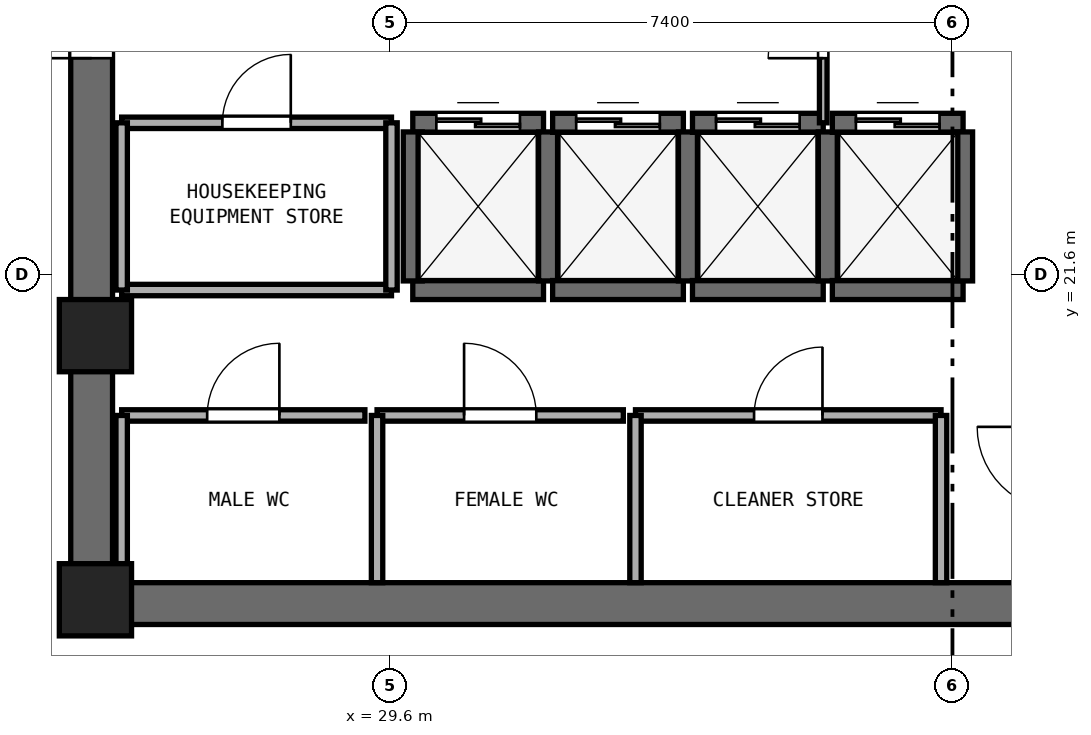
"""IFC4 building model, lengths in metres.
Left out: names, types, materials, properties, quantities, classifications, styles, units other than length and angle.
Written with IfcOpenShell. Run it as: python <this file> out.ifc"""

import sys

from ifc_helpers import new_model, si_unit, direction, frame, frame_2d, origin, origin_2d, place, context, subcontext, project, spatial, rectangle, extrude, element, fill, save


model = new_model("IFC4")
c1 = context("Model", 3, precision=1e-05, world=origin(), true_north=direction((0.0, 1.0)))
c2 = subcontext(c1, "Body", "Model", "MODEL_VIEW")
j1 = project(units=[si_unit("LENGTHUNIT", "METRE"), si_unit("PLANEANGLEUNIT", "RADIAN")], contexts=[c1])
p1 = place(None, origin())
s1 = spatial("IfcSite", under=j1, at=p1, CompositionType="ELEMENT")
p2 = place(p1, origin())
s2 = spatial("IfcBuilding", under=s1, at=p2, CompositionType="ELEMENT")
p3 = place(p2, frame((0.0, 0.0, 208.6)))
s3 = spatial("IfcBuildingStorey", under=s2, at=p3, CompositionType="ELEMENT", Elevation=208.6)
p4 = place(p3, frame((25.4, 17.275, 0.0), z_axis=(0.0, 0.0, 1.0), x_axis=(1.0, 0.0, 0.0)))
e1 = element("IfcWall", 1, at=p4, inside=s3, PredefinedType="SHEAR", context=c2, shape_type="SweptSolid", body=[
    extrude(rectangle(XDim=23.2, YDim=0.55, at=frame_2d((11.6, 0.0))), origin(), (0.0, 0.0, 1.0), 3.54),
])
p5 = place(p3, frame((25.675, 17.55, 0.0), z_axis=(0.0, 0.0, 1.0), x_axis=(0.0, 1.0, 0.0)))
e2 = element("IfcWall", 2, at=p5, inside=s3, PredefinedType="SHEAR", context=c2, shape_type="SweptSolid", body=[
    extrude(rectangle(XDim=15.3, YDim=0.55, at=frame_2d((7.65, 0.0))), origin(), (0.0, 0.0, 1.0), 3.54),
])
p6 = place(p5, frame((6.9, 0.0, 0.0)))
e3 = element("IfcOpeningElement", 3, at=p6, cuts=e2, PredefinedType="OPENING", context=c2, shape_type="SweptSolid", body=[
    extrude(rectangle(XDim=1.5, YDim=2.15, at=frame_2d((0.75, 1.075))), frame((0.0, 0.285, 0.0), z_axis=(0.0, -1.0, 0.0), x_axis=(1.0, 0.0, 0.0)), (0.0, 0.0, 1.0), 0.57),
])
for number, where, z_axis, x_axis in (
    (4, (25.725, 17.325, 0.0), (0.0, 0.0, 1.0), (1.0, 0.0, 0.0)),
    (5, (25.725, 20.8, 0.0), (0.0, 0.0, 1.0), (1.0, 0.0, 0.0)),
):
    element("IfcColumn", number, at=place(p3, frame(where, z_axis=z_axis, x_axis=x_axis)), inside=s3, PredefinedType="PILASTER", context=c2, shape_type="SweptSolid", body=[
        extrude(rectangle(XDim=0.95, YDim=0.95, at=origin_2d()), origin(), (0.0, 0.0, 1.0), 3.8),
    ])
p7 = place(p3, frame((29.9, 21.4, 0.0), z_axis=(0.0, 0.0, 1.0), x_axis=(1.0, 0.0, 0.0)))
e6 = element("IfcWall", 6, at=p7, inside=s3, PredefinedType="SHEAR", context=c2, shape_type="SweptSolid", body=[
    extrude(rectangle(XDim=1.72, YDim=0.25, at=frame_2d((0.86, 0.0))), origin(), (0.0, 0.0, 1.0), 3.54),
])
p8 = place(p3, frame((29.9, 23.6, 0.0), z_axis=(0.0, 0.0, 1.0), x_axis=(1.0, 0.0, 0.0)))
e7 = element("IfcWall", 7, at=p8, inside=s3, PredefinedType="SHEAR", context=c2, shape_type="SweptSolid", body=[
    extrude(rectangle(XDim=1.72, YDim=0.25, at=frame_2d((0.86, 0.0))), origin(), (0.0, 0.0, 1.0), 3.54),
])
p9 = place(p8, frame((0.31, 0.0, 0.0)))
e8 = element("IfcOpeningElement", 8, at=p9, cuts=e7, PredefinedType="OPENING", context=c2, shape_type="SweptSolid", body=[
    extrude(rectangle(XDim=1.1, YDim=2.15, at=frame_2d((0.55, 1.075))), frame((0.0, 0.135, 0.0), z_axis=(0.0, -1.0, 0.0), x_axis=(1.0, 0.0, 0.0)), (0.0, 0.0, 1.0), 0.27),
])
for number, where, z_axis, x_axis in (
    (9, (29.9, 21.52, 0.0), (0.0, 0.0, 1.0), (0.0, 1.0, 0.0)),
    (10, (31.68, 21.52, 0.0), (0.0, 0.0, 1.0), (0.0, 1.0, 0.0)),
):
    element("IfcWall", number, at=place(p3, frame(where, z_axis=z_axis, x_axis=x_axis)), inside=s3, PredefinedType="SHEAR", context=c2, shape_type="SweptSolid", body=[
        extrude(rectangle(XDim=1.96, YDim=0.25, at=frame_2d((0.98, 0.0))), origin(), (0.0, 0.0, 1.0), 3.54),
    ])
p10 = place(p3, frame((31.74, 21.4, 0.0), z_axis=(0.0, 0.0, 1.0), x_axis=(1.0, 0.0, 0.0)))
e11 = element("IfcWall", 11, at=p10, inside=s3, PredefinedType="SHEAR", context=c2, shape_type="SweptSolid", body=[
    extrude(rectangle(XDim=1.72, YDim=0.25, at=frame_2d((0.86, 0.0))), origin(), (0.0, 0.0, 1.0), 3.54),
])
p11 = place(p3, frame((31.74, 23.6, 0.0), z_axis=(0.0, 0.0, 1.0), x_axis=(1.0, 0.0, 0.0)))
e12 = element("IfcWall", 12, at=p11, inside=s3, PredefinedType="SHEAR", context=c2, shape_type="SweptSolid", body=[
    extrude(rectangle(XDim=1.72, YDim=0.25, at=frame_2d((0.86, 0.0))), origin(), (0.0, 0.0, 1.0), 3.54),
])
p12 = place(p11, frame((0.31, 0.0, 0.0)))
e13 = element("IfcOpeningElement", 13, at=p12, cuts=e12, PredefinedType="OPENING", context=c2, shape_type="SweptSolid", body=[
    extrude(rectangle(XDim=1.1, YDim=2.15, at=frame_2d((0.55, 1.075))), frame((0.0, 0.135, 0.0), z_axis=(0.0, -1.0, 0.0), x_axis=(1.0, 0.0, 0.0)), (0.0, 0.0, 1.0), 0.27),
])
p13 = place(p3, frame((33.52, 21.52, 0.0), z_axis=(0.0, 0.0, 1.0), x_axis=(0.0, 1.0, 0.0)))
e14 = element("IfcWall", 14, at=p13, inside=s3, PredefinedType="SHEAR", context=c2, shape_type="SweptSolid", body=[
    extrude(rectangle(XDim=1.96, YDim=0.25, at=frame_2d((0.98, 0.0))), origin(), (0.0, 0.0, 1.0), 3.54),
])
p14 = place(p3, frame((33.58, 21.4, 0.0), z_axis=(0.0, 0.0, 1.0), x_axis=(1.0, 0.0, 0.0)))
e15 = element("IfcWall", 15, at=p14, inside=s3, PredefinedType="SHEAR", context=c2, shape_type="SweptSolid", body=[
    extrude(rectangle(XDim=1.72, YDim=0.25, at=frame_2d((0.86, 0.0))), origin(), (0.0, 0.0, 1.0), 3.54),
])
p15 = place(p3, frame((33.58, 23.6, 0.0), z_axis=(0.0, 0.0, 1.0), x_axis=(1.0, 0.0, 0.0)))
e16 = element("IfcWall", 16, at=p15, inside=s3, PredefinedType="SHEAR", context=c2, shape_type="SweptSolid", body=[
    extrude(rectangle(XDim=1.72, YDim=0.25, at=frame_2d((0.86, 0.0))), origin(), (0.0, 0.0, 1.0), 3.54),
])
p16 = place(p15, frame((0.31, 0.0, 0.0)))
e17 = element("IfcOpeningElement", 17, at=p16, cuts=e16, PredefinedType="OPENING", context=c2, shape_type="SweptSolid", body=[
    extrude(rectangle(XDim=1.1, YDim=2.15, at=frame_2d((0.55, 1.075))), frame((0.0, 0.135, 0.0), z_axis=(0.0, -1.0, 0.0), x_axis=(1.0, 0.0, 0.0)), (0.0, 0.0, 1.0), 0.27),
])
p17 = place(p3, frame((35.36, 21.52, 0.0), z_axis=(0.0, 0.0, 1.0), x_axis=(0.0, 1.0, 0.0)))
e18 = element("IfcWall", 18, at=p17, inside=s3, PredefinedType="SHEAR", context=c2, shape_type="SweptSolid", body=[
    extrude(rectangle(XDim=1.96, YDim=0.25, at=frame_2d((0.98, 0.0))), origin(), (0.0, 0.0, 1.0), 3.54),
])
p18 = place(p3, frame((35.42, 21.4, 0.0), z_axis=(0.0, 0.0, 1.0), x_axis=(1.0, 0.0, 0.0)))
e19 = element("IfcWall", 19, at=p18, inside=s3, PredefinedType="SHEAR", context=c2, shape_type="SweptSolid", body=[
    extrude(rectangle(XDim=1.72, YDim=0.25, at=frame_2d((0.86, 0.0))), origin(), (0.0, 0.0, 1.0), 3.54),
])
p19 = place(p3, frame((35.42, 23.6, 0.0), z_axis=(0.0, 0.0, 1.0), x_axis=(1.0, 0.0, 0.0)))
e20 = element("IfcWall", 20, at=p19, inside=s3, PredefinedType="SHEAR", context=c2, shape_type="SweptSolid", body=[
    extrude(rectangle(XDim=1.72, YDim=0.25, at=frame_2d((0.86, 0.0))), origin(), (0.0, 0.0, 1.0), 3.54),
])
p20 = place(p19, frame((0.31, 0.0, 0.0)))
e21 = element("IfcOpeningElement", 21, at=p20, cuts=e20, PredefinedType="OPENING", context=c2, shape_type="SweptSolid", body=[
    extrude(rectangle(XDim=1.1, YDim=2.15, at=frame_2d((0.55, 1.075))), frame((0.0, 0.135, 0.0), z_axis=(0.0, -1.0, 0.0), x_axis=(1.0, 0.0, 0.0)), (0.0, 0.0, 1.0), 0.27),
])
p21 = place(p3, frame((37.14, 21.52, 0.0), z_axis=(0.0, 0.0, 1.0), x_axis=(0.0, 1.0, 0.0)))
e22 = element("IfcWall", 22, at=p21, inside=s3, PredefinedType="SHEAR", context=c2, shape_type="SweptSolid", body=[
    extrude(rectangle(XDim=1.96, YDim=0.25, at=frame_2d((0.98, 0.0))), origin(), (0.0, 0.0, 1.0), 3.54),
])
p22 = place(p3, frame((26.07, 19.75, 0.0), z_axis=(0.0, 0.0, 1.0), x_axis=(1.0, 0.0, 0.0)))
e23 = element("IfcWall", 23, at=p22, inside=s3, PredefinedType="PARTITIONING", context=c2, shape_type="SweptSolid", body=[
    extrude(rectangle(XDim=3.2, YDim=0.15, at=frame_2d((1.6, 0.0))), origin(), (0.0, 0.0, 1.0), 3.54),
])
p23 = place(p22, frame((1.125, 0.0, 0.0)))
e24 = element("IfcOpeningElement", 24, at=p23, cuts=e23, PredefinedType="OPENING", context=c2, shape_type="SweptSolid", body=[
    extrude(rectangle(XDim=0.95, YDim=2.1, at=frame_2d((0.475, 1.05))), frame((0.0, 0.085, 0.0), z_axis=(0.0, -1.0, 0.0), x_axis=(1.0, 0.0, 0.0)), (0.0, 0.0, 1.0), 0.17),
])
p24 = place(p3, frame((26.07, 17.55, 0.0), z_axis=(0.0, 0.0, 1.0), x_axis=(0.0, 1.0, 0.0)))
e25 = element("IfcWall", 25, at=p24, inside=s3, PredefinedType="PARTITIONING", context=c2, shape_type="SweptSolid", body=[
    extrude(rectangle(XDim=2.2, YDim=0.15, at=frame_2d((1.1, 0.0))), origin(), (0.0, 0.0, 1.0), 2.64),
])
p25 = place(p3, frame((29.43, 19.75, 0.0), z_axis=(0.0, 0.0, 1.0), x_axis=(1.0, 0.0, 0.0)))
e26 = element("IfcWall", 26, at=p25, inside=s3, PredefinedType="PARTITIONING", context=c2, shape_type="SweptSolid", body=[
    extrude(rectangle(XDim=3.24, YDim=0.15, at=frame_2d((1.62, 0.0))), origin(), (0.0, 0.0, 1.0), 3.54),
])
p26 = place(p25, frame((1.145, 0.0, 0.0)))
e27 = element("IfcOpeningElement", 27, at=p26, cuts=e26, PredefinedType="OPENING", context=c2, shape_type="SweptSolid", body=[
    extrude(rectangle(XDim=0.95, YDim=2.1, at=frame_2d((0.475, 1.05))), frame((0.0, 0.085, 0.0), z_axis=(0.0, -1.0, 0.0), x_axis=(1.0, 0.0, 0.0)), (0.0, 0.0, 1.0), 0.17),
])
p27 = place(p3, frame((29.43, 17.55, 0.0), z_axis=(0.0, 0.0, 1.0), x_axis=(0.0, 1.0, 0.0)))
e28 = element("IfcWall", 28, at=p27, inside=s3, PredefinedType="PARTITIONING", context=c2, shape_type="SweptSolid", body=[
    extrude(rectangle(XDim=2.2, YDim=0.15, at=frame_2d((1.1, 0.0))), origin(), (0.0, 0.0, 1.0), 3.54),
])
p28 = place(p3, frame((32.83, 19.75, 0.0), z_axis=(0.0, 0.0, 1.0), x_axis=(1.0, 0.0, 0.0)))
e29 = element("IfcWall", 29, at=p28, inside=s3, PredefinedType="PARTITIONING", context=c2, shape_type="SweptSolid", body=[
    extrude(rectangle(XDim=4.02, YDim=0.15, at=frame_2d((2.01, 0.0))), origin(), (0.0, 0.0, 1.0), 3.54),
])
p29 = place(p28, frame((1.56, 0.0, 0.0)))
e30 = element("IfcOpeningElement", 30, at=p29, cuts=e29, PredefinedType="OPENING", context=c2, shape_type="SweptSolid", body=[
    extrude(rectangle(XDim=0.9, YDim=2.1, at=frame_2d((0.45, 1.05))), frame((0.0, 0.085, 0.0), z_axis=(0.0, -1.0, 0.0), x_axis=(1.0, 0.0, 0.0)), (0.0, 0.0, 1.0), 0.17),
])
for number, where, z_axis, x_axis in (
    (31, (32.83, 17.55, 0.0), (0.0, 0.0, 1.0), (0.0, 1.0, 0.0)),
    (32, (36.85, 17.55, 0.0), (0.0, 0.0, 1.0), (0.0, 1.0, 0.0)),
):
    element("IfcWall", number, at=place(p3, frame(where, z_axis=z_axis, x_axis=x_axis)), inside=s3, PredefinedType="PARTITIONING", context=c2, shape_type="SweptSolid", body=[
        extrude(rectangle(XDim=2.2, YDim=0.15, at=frame_2d((1.1, 0.0))), origin(), (0.0, 0.0, 1.0), 3.54),
    ])
p30 = place(p3, frame((26.07, 21.4, 0.0), z_axis=(0.0, 0.0, 1.0), x_axis=(1.0, 0.0, 0.0)))
e33 = element("IfcWall", 33, at=p30, inside=s3, PredefinedType="PARTITIONING", context=c2, shape_type="SweptSolid", body=[
    extrude(rectangle(XDim=3.55, YDim=0.15, at=frame_2d((1.775, 0.0))), origin(), (0.0, 0.0, 1.0), 3.54),
])
p31 = place(p3, frame((26.07, 23.6, 0.0), z_axis=(0.0, 0.0, 1.0), x_axis=(1.0, 0.0, 0.0)))
e34 = element("IfcWall", 34, at=p31, inside=s3, PredefinedType="PARTITIONING", context=c2, shape_type="SweptSolid", body=[
    extrude(rectangle(XDim=3.55, YDim=0.15, at=frame_2d((1.775, 0.0))), origin(), (0.0, 0.0, 1.0), 3.54),
])
p32 = place(p31, frame((1.325, 0.0, 0.0)))
e35 = element("IfcOpeningElement", 35, at=p32, cuts=e34, PredefinedType="OPENING", context=c2, shape_type="SweptSolid", body=[
    extrude(rectangle(XDim=0.9, YDim=2.1, at=frame_2d((0.45, 1.05))), frame((0.0, 0.085, 0.0), z_axis=(0.0, -1.0, 0.0), x_axis=(1.0, 0.0, 0.0)), (0.0, 0.0, 1.0), 0.17),
])
p33 = place(p3, frame((26.07, 21.4, 0.0), z_axis=(0.0, 0.0, 1.0), x_axis=(0.0, 1.0, 0.0)))
e36 = element("IfcWall", 36, at=p33, inside=s3, PredefinedType="PARTITIONING", context=c2, shape_type="SweptSolid", body=[
    extrude(rectangle(XDim=2.2, YDim=0.15, at=frame_2d((1.1, 0.0))), origin(), (0.0, 0.0, 1.0), 2.64),
])
p34 = place(p3, frame((29.62, 21.4, 0.0), z_axis=(0.0, 0.0, 1.0), x_axis=(0.0, 1.0, 0.0)))
e37 = element("IfcWall", 37, at=p34, inside=s3, PredefinedType="PARTITIONING", context=c2, shape_type="SweptSolid", body=[
    extrude(rectangle(XDim=2.2, YDim=0.15, at=frame_2d((1.1, 0.0))), origin(), (0.0, 0.0, 1.0), 3.54),
])
p35 = place(p3, frame((35.3, 23.6, 0.0), z_axis=(0.0, 0.0, 1.0), x_axis=(0.0, 1.0, 0.0)))
e38 = element("IfcWall", 38, at=p35, inside=s3, PredefinedType="PARTITIONING", context=c2, shape_type="SweptSolid", body=[
    extrude(rectangle(XDim=3.2, YDim=0.1, at=frame_2d((1.6, 0.0))), origin(), (0.0, 0.0, 1.0), 3.54),
])
p36 = place(p35, frame((0.85, 0.0, 0.0)))
e39 = element("IfcOpeningElement", 39, at=p36, cuts=e38, PredefinedType="OPENING", context=c2, shape_type="SweptSolid", body=[
    extrude(rectangle(XDim=1.45, YDim=2.12, at=frame_2d((0.725, 1.06))), frame((0.0, 0.06, 0.0), z_axis=(0.0, -1.0, 0.0), x_axis=(1.0, 0.0, 0.0)), (0.0, 0.0, 1.0), 0.12),
])
p37 = place(p9, origin())
e40 = element("IfcDoor", 40, at=p37, inside=s3, OperationType="DOUBLE_DOOR_SLIDING", PredefinedType="DOOR", context=c2, shape_type="SweptSolid", body=[
    extrude(rectangle(XDim=1.1, YDim=2.15, at=frame_2d((0.55, 1.075))), frame((0.0, 0.025, 0.0), z_axis=(0.0, -1.0, 0.0), x_axis=(1.0, 0.0, 0.0)), (0.0, 0.0, 1.0), 0.05),
])
fill(e8, e40)
p38 = place(p12, origin())
e41 = element("IfcDoor", 41, at=p38, inside=s3, OperationType="DOUBLE_DOOR_SLIDING", PredefinedType="DOOR", context=c2, shape_type="SweptSolid", body=[
    extrude(rectangle(XDim=1.1, YDim=2.15, at=frame_2d((0.55, 1.075))), frame((0.0, 0.025, 0.0), z_axis=(0.0, -1.0, 0.0), x_axis=(1.0, 0.0, 0.0)), (0.0, 0.0, 1.0), 0.05),
])
fill(e13, e41)
p39 = place(p16, origin())
e42 = element("IfcDoor", 42, at=p39, inside=s3, OperationType="DOUBLE_DOOR_SLIDING", PredefinedType="DOOR", context=c2, shape_type="SweptSolid", body=[
    extrude(rectangle(XDim=1.1, YDim=2.15, at=frame_2d((0.55, 1.075))), frame((0.0, 0.025, 0.0), z_axis=(0.0, -1.0, 0.0), x_axis=(1.0, 0.0, 0.0)), (0.0, 0.0, 1.0), 0.05),
])
fill(e17, e42)
p40 = place(p20, origin())
e43 = element("IfcDoor", 43, at=p40, inside=s3, OperationType="DOUBLE_DOOR_SLIDING", PredefinedType="DOOR", context=c2, shape_type="SweptSolid", body=[
    extrude(rectangle(XDim=1.1, YDim=2.15, at=frame_2d((0.55, 1.075))), frame((0.0, 0.025, 0.0), z_axis=(0.0, -1.0, 0.0), x_axis=(1.0, 0.0, 0.0)), (0.0, 0.0, 1.0), 0.05),
])
fill(e21, e43)
p41 = place(p6, origin())
e44 = element("IfcDoor", 44, at=p41, inside=s3, OperationType="DOUBLE_DOOR_SINGLE_SWING", PredefinedType="DOOR", context=c2, shape_type="SweptSolid", body=[
    extrude(rectangle(XDim=1.5, YDim=2.15, at=frame_2d((0.75, 1.075))), frame((0.0, 0.025, 0.0), z_axis=(0.0, -1.0, 0.0), x_axis=(1.0, 0.0, 0.0)), (0.0, 0.0, 1.0), 0.05),
])
fill(e3, e44)
p42 = place(p23, origin())
e45 = element("IfcDoor", 45, at=p42, inside=s3, OperationType="SINGLE_SWING_RIGHT", PredefinedType="DOOR", context=c2, shape_type="SweptSolid", body=[
    extrude(rectangle(XDim=0.95, YDim=2.1, at=frame_2d((0.475, 1.05))), frame((0.0, 0.025, 0.0), z_axis=(0.0, -1.0, 0.0), x_axis=(1.0, 0.0, 0.0)), (0.0, 0.0, 1.0), 0.05),
])
fill(e24, e45)
p43 = place(p26, origin())
e46 = element("IfcDoor", 46, at=p43, inside=s3, OperationType="SINGLE_SWING_LEFT", PredefinedType="DOOR", context=c2, shape_type="SweptSolid", body=[
    extrude(rectangle(XDim=0.95, YDim=2.1, at=frame_2d((0.475, 1.05))), frame((0.0, 0.025, 0.0), z_axis=(0.0, -1.0, 0.0), x_axis=(1.0, 0.0, 0.0)), (0.0, 0.0, 1.0), 0.05),
])
fill(e27, e46)
p44 = place(p29, origin())
e47 = element("IfcDoor", 47, at=p44, inside=s3, OperationType="SINGLE_SWING_RIGHT", PredefinedType="DOOR", context=c2, shape_type="SweptSolid", body=[
    extrude(rectangle(XDim=0.9, YDim=2.1, at=frame_2d((0.45, 1.05))), frame((0.0, 0.025, 0.0), z_axis=(0.0, -1.0, 0.0), x_axis=(1.0, 0.0, 0.0)), (0.0, 0.0, 1.0), 0.05),
])
fill(e30, e47)
p45 = place(p32, origin())
e48 = element("IfcDoor", 48, at=p45, inside=s3, OperationType="SINGLE_SWING_RIGHT", PredefinedType="DOOR", context=c2, shape_type="SweptSolid", body=[
    extrude(rectangle(XDim=0.9, YDim=2.1, at=frame_2d((0.45, 1.05))), frame((0.0, 0.025, 0.0), z_axis=(0.0, -1.0, 0.0), x_axis=(1.0, 0.0, 0.0)), (0.0, 0.0, 1.0), 0.05),
])
fill(e35, e48)
p46 = place(p36, origin())
e49 = element("IfcDoor", 49, at=p46, inside=s3, OperationType="DOUBLE_DOOR_SINGLE_SWING", PredefinedType="DOOR", context=c2, shape_type="SweptSolid", body=[
    extrude(rectangle(XDim=1.45, YDim=2.12, at=frame_2d((0.725, 1.06))), frame((0.0, 0.025, 0.0), z_axis=(0.0, -1.0, 0.0), x_axis=(1.0, 0.0, 0.0)), (0.0, 0.0, 1.0), 0.05),
])
fill(e39, e49)
save(model, sys.argv[1])
